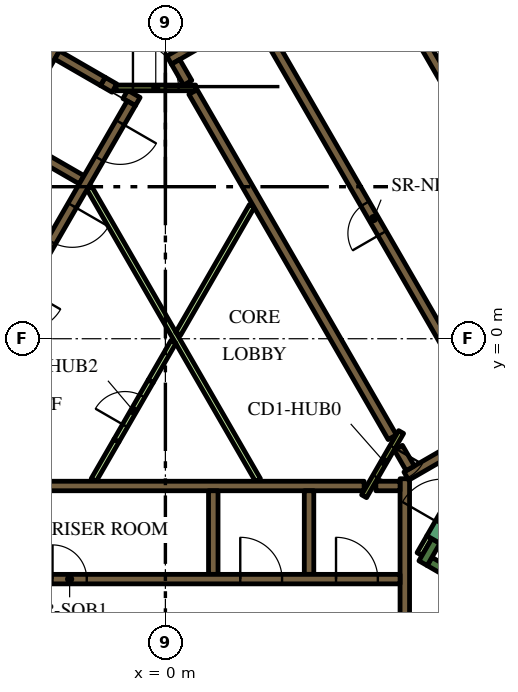
"""IFC4 building model, lengths in metres.
Left out: names, types, materials, properties, quantities, classifications, styles, units other than length and angle.
Written with IfcOpenShell. Run it as: python <this file> out.ifc"""

import sys

from ifc_helpers import new_model, si_unit, direction, frame, frame_2d, origin, place, context, subcontext, project, spatial, polyline, rectangle, outline, extrude, element, fill, save


model = new_model("IFC4")
c1 = context("Model", 3, precision=1e-05, world=origin(), true_north=direction((0.0, 1.0)))
c2 = subcontext(c1, "Body", "Model", "MODEL_VIEW")
j1 = project(units=[si_unit("LENGTHUNIT", "METRE"), si_unit("PLANEANGLEUNIT", "RADIAN")], contexts=[c1])
p1 = place(None, origin())
s1 = spatial("IfcSite", under=j1, at=p1, CompositionType="ELEMENT")
p2 = place(p1, origin())
s2 = spatial("IfcBuilding", under=s1, at=p2, CompositionType="ELEMENT")
p3 = place(p2, frame((0.0, 0.0, 118.8)))
s3 = spatial("IfcBuildingStorey", under=s2, at=p3, CompositionType="ELEMENT", Elevation=118.8)
p4 = place(p3, frame((6.776, 13.364, 0.0), z_axis=(0.0, 0.0, 1.0), x_axis=(0.500004177138, -0.8660229921, 0.0)))
e1 = element("IfcWall", 1, at=p4, inside=s3, PredefinedType="SOLIDWALL", context=c2, shape_type="SweptSolid", body=[
    extrude(rectangle(XDim=20.204, YDim=0.9, at=frame_2d((10.102, 0.0))), origin(), (0.0, 0.0, 1.0), 3.9),
])
p5 = place(p3, frame((12.84, -9.261, 0.0), z_axis=(0.0, 0.0, 1.0), x_axis=(-0.866013990052, 0.500019768644, 0.0)))
e2 = element("IfcWall", 2, at=p5, inside=s3, PredefinedType="SOLIDWALL", context=c2, shape_type="SweptSolid", body=[
    extrude(rectangle(XDim=6.8, YDim=0.25, at=frame_2d((3.4, 0.0))), origin(), (0.0, 0.0, 1.0), 3.9),
])
p6 = place(p3, frame((6.78, -5.906, 0.0), z_axis=(0.0, 0.0, 1.0), x_axis=(0.500223362819, 0.865896406789, 0.0)))
e3 = element("IfcWall", 3, at=p6, inside=s3, PredefinedType="SOLIDWALL", context=c2, shape_type="SweptSolid", body=[
    extrude(rectangle(XDim=0.675, YDim=0.25, at=frame_2d((0.337, 0.0))), origin(), (0.0, 0.0, 1.0), 3.9),
])
p7 = place(p3, frame((-5.259, -3.875, 0.0), z_axis=(0.0, 0.0, 1.0), x_axis=(1.0, 0.0, 0.0)))
e4 = element("IfcWall", 4, at=p7, inside=s3, PredefinedType="SOLIDWALL", context=c2, shape_type="SweptSolid", body=[
    extrude(rectangle(XDim=10.489, YDim=0.25, at=frame_2d((5.244, 0.0))), origin(), (0.0, 0.0, 1.0), 3.9),
])
for number, where, z_axis, x_axis in (
    (5, (3.78, -4.0, 0.0), (0.0, 0.0, 1.0), (0.0, -1.0, 0.0)),
    (6, (1.26, -4.0, 0.0), (0.0, 0.0, 1.0), (0.0, -1.0, 0.0)),
):
    element("IfcWall", number, at=place(p3, frame(where, z_axis=z_axis, x_axis=x_axis)), inside=s3, PredefinedType="SOLIDWALL", context=c2, shape_type="SweptSolid", body=[
        extrude(rectangle(XDim=2.2, YDim=0.25, at=frame_2d((1.1, 0.0))), origin(), (0.0, 0.0, 1.0), 3.9),
    ])
p8 = place(p3, frame((6.3, -7.27, 0.0), z_axis=(0.0, 0.0, 1.0), x_axis=(0.0, 1.0, 0.0)))
e7 = element("IfcWall", 7, at=p8, inside=s3, PredefinedType="SOLIDWALL", context=c2, shape_type="SweptSolid", body=[
    extrude(rectangle(XDim=3.586, YDim=0.25, at=frame_2d((1.793, 0.0))), origin(), (0.0, 0.0, 1.0), 3.9),
])
p9 = place(p3, frame((5.538, -3.875, 0.0), z_axis=(0.0, 0.0, 1.0), x_axis=(1.0, 0.0, 0.0)))
e8 = element("IfcWall", 8, at=p9, inside=s3, PredefinedType="SOLIDWALL", context=c2, shape_type="SweptSolid", body=[
    extrude(rectangle(XDim=0.637, YDim=0.25, at=frame_2d((0.318, 0.0))), origin(), (0.0, 0.0, 1.0), 3.9),
])
p10 = place(p3, frame((9.346, -1.879, 0.0), z_axis=(0.0, 0.0, 1.0), x_axis=(-0.866048528039, -0.499959945477, 0.0)))
e9 = element("IfcWall", 9, at=p10, inside=s3, PredefinedType="SOLIDWALL", context=c2, shape_type="SweptSolid", body=[
    extrude(rectangle(XDim=3.47, YDim=0.25, at=frame_2d((1.735, 0.0))), origin(), (0.0, 0.0, 1.0), 3.9),
])
p11 = place(p3, frame((6.13, -2.867, 0.0), z_axis=(0.0, 0.0, 1.0), x_axis=(0.500160776593, -0.865932559475, 0.0)))
e10 = element("IfcWall", 10, at=p11, inside=s3, PredefinedType="SOLIDWALL", context=c2, shape_type="SweptSolid", body=[
    extrude(rectangle(XDim=0.627, YDim=0.25, at=frame_2d((0.313, 0.0))), origin(), (0.0, 0.0, 1.0), 3.9),
])
p12 = place(p3, origin())
e11 = element("IfcWall", 11, at=p12, inside=s3, PredefinedType="SOLIDWALL", context=c2, shape_type="SweptSolid", body=[
    extrude(outline(polyline([(2.776, 8.733), (2.499, 8.573), (2.498, 8.573), (2.498, 8.573), (2.282, 8.448), (2.282, 8.448), (0.377, 7.348), (0.16, 7.223), (0.035, 7.439), (3.032, 9.169), (3.03, 9.152), (3.03, 9.133), (3.031, 9.113), (3.035, 9.094), (3.04, 9.075), (3.047, 9.057), (3.056, 9.039), (3.119, 8.931), (2.776, 8.733)])), origin(), (0.0, 0.0, 1.0), 3.9),
])
p13 = place(p3, frame((0.268, 7.285, 0.0), z_axis=(0.0, 0.0, 1.0), x_axis=(0.500098681536, -0.865968422476, 0.0)))
e12 = element("IfcWall", 12, at=p13, inside=s3, PredefinedType="SOLIDWALL", context=c2, shape_type="SweptSolid", body=[
    extrude(rectangle(XDim=0.636, YDim=0.25, at=frame_2d((0.318, 0.0))), origin(), (0.0, 0.0, 1.0), 3.9),
])
p14 = place(p3, frame((5.97, -2.591, 0.0), z_axis=(0.0, 0.0, 1.0), x_axis=(-0.499994469932, 0.866028596547, 0.0)))
e13 = element("IfcWall", 13, at=p14, inside=s3, PredefinedType="SOLIDWALL", context=c2, shape_type="SweptSolid", body=[
    extrude(rectangle(XDim=10.488, YDim=0.25, at=frame_2d((5.244, 0.0))), origin(), (0.0, 0.0, 1.0), 3.9),
])
p15 = place(p3, frame((-8.06, -1.311, 0.0), z_axis=(0.0, 0.0, 1.0), x_axis=(0.50000273126, 0.866023826885, 0.0)))
e14 = element("IfcWall", 14, at=p15, inside=s3, PredefinedType="SOLIDWALL", context=c2, shape_type="SweptSolid", body=[
    extrude(rectangle(XDim=10.33, YDim=0.25, at=frame_2d((5.165, 0.0))), origin(), (0.0, 0.0, 1.0), 3.9),
])
p16 = place(p3, frame((-1.342, 6.595, 0.0), z_axis=(0.0, 0.0, 1.0), x_axis=(-0.866046247233, 0.49996389635, 0.0)))
e15 = element("IfcWall", 15, at=p16, inside=s3, PredefinedType="SOLIDWALL", context=c2, shape_type="SweptSolid", body=[
    extrude(rectangle(XDim=0.35, YDim=0.25, at=frame_2d((0.175, 0.0))), origin(), (0.0, 0.0, 1.0), 3.9),
])
p17 = place(p3, frame((-1.647, 6.771, 0.0), z_axis=(0.0, 0.0, 1.0), x_axis=(-0.865971728693, 0.500092956464, 0.0)))
e16 = element("IfcWall", 16, at=p17, inside=s3, PredefinedType="SOLIDWALL", context=c2, shape_type="SweptSolid", body=[
    extrude(rectangle(XDim=1.388, YDim=0.25, at=frame_2d((0.694, 0.0))), origin(), (0.0, 0.0, 1.0), 3.9),
])
p18 = place(p3, frame((-0.728, 6.24, 0.0), z_axis=(0.0, 0.0, 1.0), x_axis=(-0.866088799389, 0.499890179513, 0.0)))
e17 = element("IfcWall", 17, at=p18, inside=s3, PredefinedType="SOLIDWALL", context=c2, shape_type="SweptSolid", body=[
    extrude(rectangle(XDim=0.378, YDim=0.25, at=frame_2d((0.189, 0.0))), origin(), (0.0, 0.0, 1.0), 3.9),
])
p19 = place(p3, frame((-2.204, 4.182, 0.0), z_axis=(0.0, 0.0, 1.0), x_axis=(-0.866008176907, 0.50002983664, 0.0)))
e18 = element("IfcWall", 18, at=p19, inside=s3, PredefinedType="SOLIDWALL", context=c2, shape_type="SweptSolid", body=[
    extrude(rectangle(XDim=2.2, YDim=0.25, at=frame_2d((1.1, 0.0))), origin(), (0.0, 0.0, 1.0), 3.9),
])
p20 = place(p3, frame((-1.887, -3.718, 0.0), z_axis=(0.0, 0.0, 1.0), x_axis=(0.500057179532, 0.865992388649, 0.0)))
e19 = element("IfcWall", 19, at=p20, inside=s3, PredefinedType="PARTITIONING", context=c2, shape_type="SweptSolid", body=[
    extrude(rectangle(XDim=1.199, YDim=0.15, at=frame_2d((0.6, 0.0))), origin(), (0.0, 0.0, 1.0), 2.75),
])
p21 = place(p3, frame((6.945, -5.222, 0.0), z_axis=(0.0, 0.0, 1.0), x_axis=(-0.499818422106, -0.866130212453, 0.0)))
e20 = element("IfcWall", 20, at=p21, inside=s3, PredefinedType="PARTITIONING", context=c2, shape_type="SweptSolid", body=[
    extrude(rectangle(XDim=0.514, YDim=0.15, at=frame_2d((0.257, 0.0))), origin(), (0.0, 0.0, 1.0), 2.75),
])
p22 = place(p3, frame((2.435, -3.718, 0.0), z_axis=(0.0, 0.0, 1.0), x_axis=(-0.499985176046, 0.866033962229, 0.0)))
e21 = element("IfcWall", 21, at=p22, inside=s3, PredefinedType="PARTITIONING", context=c2, shape_type="SweptSolid", body=[
    extrude(rectangle(XDim=8.875, YDim=0.15, at=frame_2d((4.438, 0.0))), origin(), (0.0, 0.0, 1.0), 2.75),
])
p23 = place(p3, frame((0.336, 0.132, 0.0), z_axis=(0.0, 0.0, 1.0), x_axis=(0.500001957507, 0.866024273614, 0.0)))
e22 = element("IfcWall", 22, at=p23, inside=s3, PredefinedType="PARTITIONING", context=c2, shape_type="SweptSolid", body=[
    extrude(rectangle(XDim=3.881, YDim=0.15, at=frame_2d((1.941, 0.0))), origin(), (0.0, 0.0, 1.0), 2.75),
])
p24 = place(p3, frame((-0.387, -1.121, 0.0), z_axis=(0.0, 0.0, 1.0), x_axis=(0.500057179532, 0.865992388649, 0.0)))
e23 = element("IfcWall", 23, at=p24, inside=s3, PredefinedType="PARTITIONING", context=c2, shape_type="SweptSolid", body=[
    extrude(rectangle(XDim=1.199, YDim=0.15, at=frame_2d((0.6, 0.0))), origin(), (0.0, 0.0, 1.0), 2.75),
])
p25 = place(p3, frame((-6.175, -6.325, 0.0), z_axis=(0.0, 0.0, 1.0), x_axis=(1.0, 0.0, 0.0)))
e24 = element("IfcWall", 24, at=p25, inside=s3, PredefinedType="SOLIDWALL", context=c2, shape_type="SweptSolid", body=[
    extrude(rectangle(XDim=12.35, YDim=0.25, at=frame_2d((6.175, 0.0))), origin(), (0.0, 0.0, 1.0), 3.9),
])
p26 = place(p25, frame((3.205, 0.0, 0.0)))
e25 = element("IfcOpeningElement", 25, at=p26, cuts=e24, PredefinedType="OPENING", context=c2, shape_type="SweptSolid", body=[
    extrude(rectangle(XDim=0.9, YDim=2.1, at=frame_2d((0.45, 1.05))), frame((0.0, 0.135, 0.0), z_axis=(0.0, -1.0, 0.0), x_axis=(1.0, 0.0, 0.0)), (0.0, 0.0, 1.0), 0.27),
])
p27 = place(p25, frame((8.145, 0.0, 0.0)))
e26 = element("IfcOpeningElement", 26, at=p27, cuts=e24, PredefinedType="OPENING", context=c2, shape_type="SweptSolid", body=[
    extrude(rectangle(XDim=1.1, YDim=2.1, at=frame_2d((0.55, 1.05))), frame((0.0, 0.135, 0.0), z_axis=(0.0, -1.0, 0.0), x_axis=(1.0, 0.0, 0.0)), (0.0, 0.0, 1.0), 0.27),
])
p28 = place(p25, frame((10.665, 0.0, 0.0)))
e27 = element("IfcOpeningElement", 27, at=p28, cuts=e24, PredefinedType="OPENING", context=c2, shape_type="SweptSolid", body=[
    extrude(rectangle(XDim=1.1, YDim=2.1, at=frame_2d((0.55, 1.05))), frame((0.0, 0.135, 0.0), z_axis=(0.0, -1.0, 0.0), x_axis=(1.0, 0.0, 0.0)), (0.0, 0.0, 1.0), 0.27),
])
p29 = place(p3, frame((11.553, -0.46, 0.0), z_axis=(0.0, 0.0, 1.0), x_axis=(-0.500006514828, 0.866021642414, 0.0)))
e28 = element("IfcWall", 28, at=p29, inside=s3, PredefinedType="SOLIDWALL", context=c2, shape_type="SweptSolid", body=[
    extrude(rectangle(XDim=12.35, YDim=0.25, at=frame_2d((6.175, 0.0))), origin(), (0.0, 0.0, 1.0), 3.9),
])
p30 = place(p29, frame((0.585, 0.0, 0.0)))
e29 = element("IfcOpeningElement", 29, at=p30, cuts=e28, PredefinedType="OPENING", context=c2, shape_type="SweptSolid", body=[
    extrude(rectangle(XDim=1.1, YDim=2.1, at=frame_2d((0.55, 1.05))), frame((0.0, 0.135, 0.0), z_axis=(0.0, -1.0, 0.0), x_axis=(1.0, 0.0, 0.0)), (0.0, 0.0, 1.0), 0.27),
])
p31 = place(p29, frame((3.105, 0.0, 0.0)))
e30 = element("IfcOpeningElement", 30, at=p31, cuts=e28, PredefinedType="OPENING", context=c2, shape_type="SweptSolid", body=[
    extrude(rectangle(XDim=1.1, YDim=2.1, at=frame_2d((0.55, 1.05))), frame((0.0, 0.135, 0.0), z_axis=(0.0, -1.0, 0.0), x_axis=(1.0, 0.0, 0.0)), (0.0, 0.0, 1.0), 0.27),
])
p32 = place(p29, frame((5.625, 0.0, 0.0)))
e31 = element("IfcOpeningElement", 31, at=p32, cuts=e28, PredefinedType="OPENING", context=c2, shape_type="SweptSolid", body=[
    extrude(rectangle(XDim=1.1, YDim=2.1, at=frame_2d((0.55, 1.05))), frame((0.0, 0.135, 0.0), z_axis=(0.0, -1.0, 0.0), x_axis=(1.0, 0.0, 0.0)), (0.0, 0.0, 1.0), 0.27),
])
p33 = place(p3, frame((8.565, -2.185, 0.0), z_axis=(0.0, 0.0, 1.0), x_axis=(-0.499997954832, 0.866026584559, 0.0)))
e32 = element("IfcWall", 32, at=p33, inside=s3, PredefinedType="SOLIDWALL", context=c2, shape_type="SweptSolid", body=[
    extrude(rectangle(XDim=12.35, YDim=0.25, at=frame_2d((6.175, 0.0))), origin(), (0.0, 0.0, 1.0), 3.9),
])
p34 = place(p33, frame((5.725, 0.0, 0.0)))
e33 = element("IfcOpeningElement", 33, at=p34, cuts=e32, PredefinedType="OPENING", context=c2, shape_type="SweptSolid", body=[
    extrude(rectangle(XDim=0.9, YDim=2.1, at=frame_2d((0.45, 1.05))), frame((0.0, 0.135, 0.0), z_axis=(0.0, -1.0, 0.0), x_axis=(1.0, 0.0, 0.0)), (0.0, 0.0, 1.0), 0.27),
])
p35 = place(p3, frame((-0.898, 6.194, 0.0), z_axis=(0.0, 0.0, 1.0), x_axis=(-0.499996202215, -0.866027596426, 0.0)))
e34 = element("IfcWall", 34, at=p35, inside=s3, PredefinedType="SOLIDWALL", context=c2, shape_type="SweptSolid", body=[
    extrude(rectangle(XDim=9.83, YDim=0.25, at=frame_2d((4.915, 0.0))), origin(), (0.0, 0.0, 1.0), 3.9),
])
p36 = place(p35, frame((0.585, 0.0, 0.0)))
e35 = element("IfcOpeningElement", 35, at=p36, cuts=e34, PredefinedType="OPENING", context=c2, shape_type="SweptSolid", body=[
    extrude(rectangle(XDim=1.1, YDim=2.1, at=frame_2d((0.55, 1.05))), frame((0.0, 0.135, 0.0), z_axis=(0.0, -1.0, 0.0), x_axis=(1.0, 0.0, 0.0)), (0.0, 0.0, 1.0), 0.27),
])
p37 = place(p35, frame((3.105, 0.0, 0.0)))
e36 = element("IfcOpeningElement", 36, at=p37, cuts=e34, PredefinedType="OPENING", context=c2, shape_type="SweptSolid", body=[
    extrude(rectangle(XDim=1.1, YDim=2.1, at=frame_2d((0.55, 1.05))), frame((0.0, 0.135, 0.0), z_axis=(0.0, -1.0, 0.0), x_axis=(1.0, 0.0, 0.0)), (0.0, 0.0, 1.0), 0.27),
])
p38 = place(p35, frame((5.625, 0.0, 0.0)))
e37 = element("IfcOpeningElement", 37, at=p38, cuts=e34, PredefinedType="OPENING", context=c2, shape_type="SweptSolid", body=[
    extrude(rectangle(XDim=1.1, YDim=2.1, at=frame_2d((0.55, 1.05))), frame((0.0, 0.135, 0.0), z_axis=(0.0, -1.0, 0.0), x_axis=(1.0, 0.0, 0.0)), (0.0, 0.0, 1.0), 0.27),
])
p39 = place(p35, frame((8.145, 0.0, 0.0)))
e38 = element("IfcOpeningElement", 38, at=p39, cuts=e34, PredefinedType="OPENING", context=c2, shape_type="SweptSolid", body=[
    extrude(rectangle(XDim=1.1, YDim=2.1, at=frame_2d((0.55, 1.05))), frame((0.0, 0.135, 0.0), z_axis=(0.0, -1.0, 0.0), x_axis=(1.0, 0.0, 0.0)), (0.0, 0.0, 1.0), 0.27),
])
p40 = place(p3, frame((7.053, -5.284, 0.0), z_axis=(0.0, 0.0, 1.0), x_axis=(0.500078061341, 0.865980330357, 0.0)))
e39 = element("IfcWall", 39, at=p40, inside=s3, PredefinedType="SOLIDWALL", context=c2, shape_type="SweptSolid", body=[
    extrude(rectangle(XDim=2.1, YDim=0.4, at=frame_2d((1.05, 0.0))), origin(), (0.0, 0.0, 1.0), 3.9),
])
p41 = place(p40, frame((0.45, 0.0, 0.0)))
e40 = element("IfcOpeningElement", 40, at=p41, cuts=e39, PredefinedType="OPENING", context=c2, shape_type="SweptSolid", body=[
    extrude(rectangle(XDim=1.2, YDim=2.1, at=frame_2d((0.6, 1.05))), frame((0.0, 0.21, 0.0), z_axis=(0.0, -1.0, 0.0), x_axis=(1.0, 0.0, 0.0)), (0.0, 0.0, 1.0), 0.42),
])
p42 = place(p3, frame((6.203, -2.456, 0.0), z_axis=(0.0, 0.0, 1.0), x_axis=(-0.500043961785, -0.866000020948, 0.0)))
e41 = element("IfcWall", 41, at=p42, inside=s3, PredefinedType="PARTITIONING", context=c2, shape_type="SweptSolid", body=[
    extrude(rectangle(XDim=1.95, YDim=0.15, at=frame_2d((0.975, 0.0))), origin(), (0.0, 0.0, 1.0), 3.9),
])
p43 = place(p42, frame((0.45, 0.0, 0.0)))
e42 = element("IfcOpeningElement", 42, at=p43, cuts=e41, PredefinedType="OPENING", context=c2, shape_type="SweptSolid", body=[
    extrude(rectangle(XDim=0.9, YDim=2.1, at=frame_2d((0.45, 1.05))), frame((0.0, 0.085, 0.0), z_axis=(0.0, -1.0, 0.0), x_axis=(1.0, 0.0, 0.0)), (0.0, 0.0, 1.0), 0.17),
])
p44 = place(p3, frame((-1.303, 6.6, 0.0), z_axis=(0.0, 0.0, 1.0), x_axis=(1.0, 0.0, 0.0)))
e43 = element("IfcWall", 43, at=p44, inside=s3, PredefinedType="PARTITIONING", context=c2, shape_type="SweptSolid", body=[
    extrude(rectangle(XDim=2.1, YDim=0.15, at=frame_2d((1.05, 0.0))), origin(), (0.0, 0.0, 1.0), 3.9),
])
p45 = place(p44, frame((0.45, 0.0, 0.0)))
e44 = element("IfcOpeningElement", 44, at=p45, cuts=e43, PredefinedType="OPENING", context=c2, shape_type="SweptSolid", body=[
    extrude(rectangle(XDim=1.2, YDim=2.1, at=frame_2d((0.6, 1.05))), frame((0.0, 0.085, 0.0), z_axis=(0.0, -1.0, 0.0), x_axis=(1.0, 0.0, 0.0)), (0.0, 0.0, 1.0), 0.17),
])
p46 = place(p3, frame((-1.287, -2.679, 0.0), z_axis=(0.0, 0.0, 1.0), x_axis=(0.499961193289, 0.866047807691, 0.0)))
e45 = element("IfcWall", 45, at=p46, inside=s3, PredefinedType="PARTITIONING", context=c2, shape_type="SweptSolid", body=[
    extrude(rectangle(XDim=1.8, YDim=0.15, at=frame_2d((0.9, 0.0))), origin(), (0.0, 0.0, 1.0), 2.75),
])
p47 = place(p46, frame((0.45, 0.0, 0.0)))
e46 = element("IfcOpeningElement", 46, at=p47, cuts=e45, PredefinedType="OPENING", context=c2, shape_type="SweptSolid", body=[
    extrude(rectangle(XDim=0.9, YDim=2.1, at=frame_2d((0.45, 1.05))), frame((0.0, 0.085, 0.0), z_axis=(0.0, -1.0, 0.0), x_axis=(1.0, 0.0, 0.0)), (0.0, 0.0, 1.0), 0.17),
])
p48 = place(p3, frame((6.163, 18.475, 0.0), z_axis=(0.0, 0.0, 1.0), x_axis=(0.500001317485, -0.866024643133, 0.0)))
e47 = element("IfcWall", 47, at=p48, inside=s3, PredefinedType="PARTITIONING", context=c2, shape_type="SweptSolid", body=[
    extrude(rectangle(XDim=25.767, YDim=0.15, at=frame_2d((12.883, 0.0))), origin(), (0.0, 0.0, 1.0), 2.75),
])
p49 = place(p48, frame((19.306, 0.0, 0.0)))
e48 = element("IfcOpeningElement", 48, at=p49, cuts=e47, PredefinedType="OPENING", context=c2, shape_type="SweptSolid", body=[
    extrude(rectangle(XDim=1.0, YDim=2.1, at=frame_2d((0.5, 1.05))), frame((0.0, 0.085, 0.0), z_axis=(0.0, -1.0, 0.0), x_axis=(1.0, 0.0, 0.0)), (0.0, 0.0, 1.0), 0.17),
])
p50 = place(p48, frame((17.999, 0.0, 0.0)))
e49 = element("IfcOpeningElement", 49, at=p50, cuts=e47, PredefinedType="OPENING", context=c2, shape_type="SweptSolid", body=[
    extrude(rectangle(XDim=1.0, YDim=2.1, at=frame_2d((0.5, 1.05))), frame((0.0, 0.085, 0.0), z_axis=(0.0, -1.0, 0.0), x_axis=(1.0, 0.0, 0.0)), (0.0, 0.0, 1.0), 0.17),
])
p51 = place(p48, frame((0.596, 0.0, 0.0)))
e50 = element("IfcOpeningElement", 50, at=p51, cuts=e47, PredefinedType="OPENING", context=c2, shape_type="SweptSolid", body=[
    extrude(rectangle(XDim=1.0, YDim=2.1, at=frame_2d((0.5, 1.05))), frame((0.0, 0.085, 0.0), z_axis=(0.0, -1.0, 0.0), x_axis=(1.0, 0.0, 0.0)), (0.0, 0.0, 1.0), 0.17),
])
p52 = place(p26, origin())
e51 = element("IfcDoor", 51, at=p52, inside=s3, OperationType="SINGLE_SWING_LEFT", PredefinedType="DOOR", context=c2, shape_type="SweptSolid", body=[
    extrude(rectangle(XDim=0.9, YDim=2.1, at=frame_2d((0.45, 1.05))), frame((0.0, 0.025, 0.0), z_axis=(0.0, -1.0, 0.0), x_axis=(1.0, 0.0, 0.0)), (0.0, 0.0, 1.0), 0.05),
])
fill(e25, e51)
p53 = place(p27, origin())
e52 = element("IfcDoor", 52, at=p53, inside=s3, OperationType="DOUBLE_DOOR_SLIDING", PredefinedType="DOOR", context=c2, shape_type="SweptSolid", body=[
    extrude(rectangle(XDim=1.1, YDim=2.1, at=frame_2d((0.55, 1.05))), frame((0.0, 0.025, 0.0), z_axis=(0.0, -1.0, 0.0), x_axis=(1.0, 0.0, 0.0)), (0.0, 0.0, 1.0), 0.05),
])
fill(e26, e52)
p54 = place(p28, origin())
e53 = element("IfcDoor", 53, at=p54, inside=s3, OperationType="DOUBLE_DOOR_SLIDING", PredefinedType="DOOR", context=c2, shape_type="SweptSolid", body=[
    extrude(rectangle(XDim=1.1, YDim=2.1, at=frame_2d((0.55, 1.05))), frame((0.0, 0.025, 0.0), z_axis=(0.0, -1.0, 0.0), x_axis=(1.0, 0.0, 0.0)), (0.0, 0.0, 1.0), 0.05),
])
fill(e27, e53)
p55 = place(p34, origin())
e54 = element("IfcDoor", 54, at=p55, inside=s3, OperationType="SINGLE_SWING_LEFT", PredefinedType="DOOR", context=c2, shape_type="SweptSolid", body=[
    extrude(rectangle(XDim=0.9, YDim=2.1, at=frame_2d((0.45, 1.05))), frame((0.0, 0.025, 0.0), z_axis=(0.0, -1.0, 0.0), x_axis=(1.0, 0.0, 0.0)), (0.0, 0.0, 1.0), 0.05),
])
fill(e33, e54)
p56 = place(p36, origin())
e55 = element("IfcDoor", 55, at=p56, inside=s3, OperationType="DOUBLE_DOOR_SLIDING", PredefinedType="DOOR", context=c2, shape_type="SweptSolid", body=[
    extrude(rectangle(XDim=1.1, YDim=2.1, at=frame_2d((0.55, 1.05))), frame((0.0, 0.025, 0.0), z_axis=(0.0, -1.0, 0.0), x_axis=(1.0, 0.0, 0.0)), (0.0, 0.0, 1.0), 0.05),
])
fill(e35, e55)
p57 = place(p37, origin())
e56 = element("IfcDoor", 56, at=p57, inside=s3, OperationType="DOUBLE_DOOR_SLIDING", PredefinedType="DOOR", context=c2, shape_type="SweptSolid", body=[
    extrude(rectangle(XDim=1.1, YDim=2.1, at=frame_2d((0.55, 1.05))), frame((0.0, 0.025, 0.0), z_axis=(0.0, -1.0, 0.0), x_axis=(1.0, 0.0, 0.0)), (0.0, 0.0, 1.0), 0.05),
])
fill(e36, e56)
p58 = place(p43, origin())
e57 = element("IfcDoor", 57, at=p58, inside=s3, OperationType="SINGLE_SWING_LEFT", PredefinedType="DOOR", context=c2, shape_type="SweptSolid", body=[
    extrude(rectangle(XDim=0.9, YDim=2.1, at=frame_2d((0.45, 1.05))), frame((0.0, 0.025, 0.0), z_axis=(0.0, -1.0, 0.0), x_axis=(1.0, 0.0, 0.0)), (0.0, 0.0, 1.0), 0.05),
])
fill(e42, e57)
p59 = place(p45, origin())
e58 = element("IfcDoor", 58, at=p59, inside=s3, OperationType="SINGLE_SWING_LEFT", PredefinedType="DOOR", context=c2, shape_type="SweptSolid", body=[
    extrude(rectangle(XDim=1.2, YDim=2.1, at=frame_2d((0.6, 1.05))), frame((0.0, 0.025, 0.0), z_axis=(0.0, -1.0, 0.0), x_axis=(1.0, 0.0, 0.0)), (0.0, 0.0, 1.0), 0.05),
])
fill(e44, e58)
p60 = place(p47, origin())
e59 = element("IfcDoor", 59, at=p60, inside=s3, OperationType="SINGLE_SWING_LEFT", PredefinedType="DOOR", context=c2, shape_type="SweptSolid", body=[
    extrude(rectangle(XDim=0.9, YDim=2.1, at=frame_2d((0.45, 1.05))), frame((0.0, 0.025, 0.0), z_axis=(0.0, -1.0, 0.0), x_axis=(1.0, 0.0, 0.0)), (0.0, 0.0, 1.0), 0.05),
])
fill(e46, e59)
save(model, sys.argv[1])
